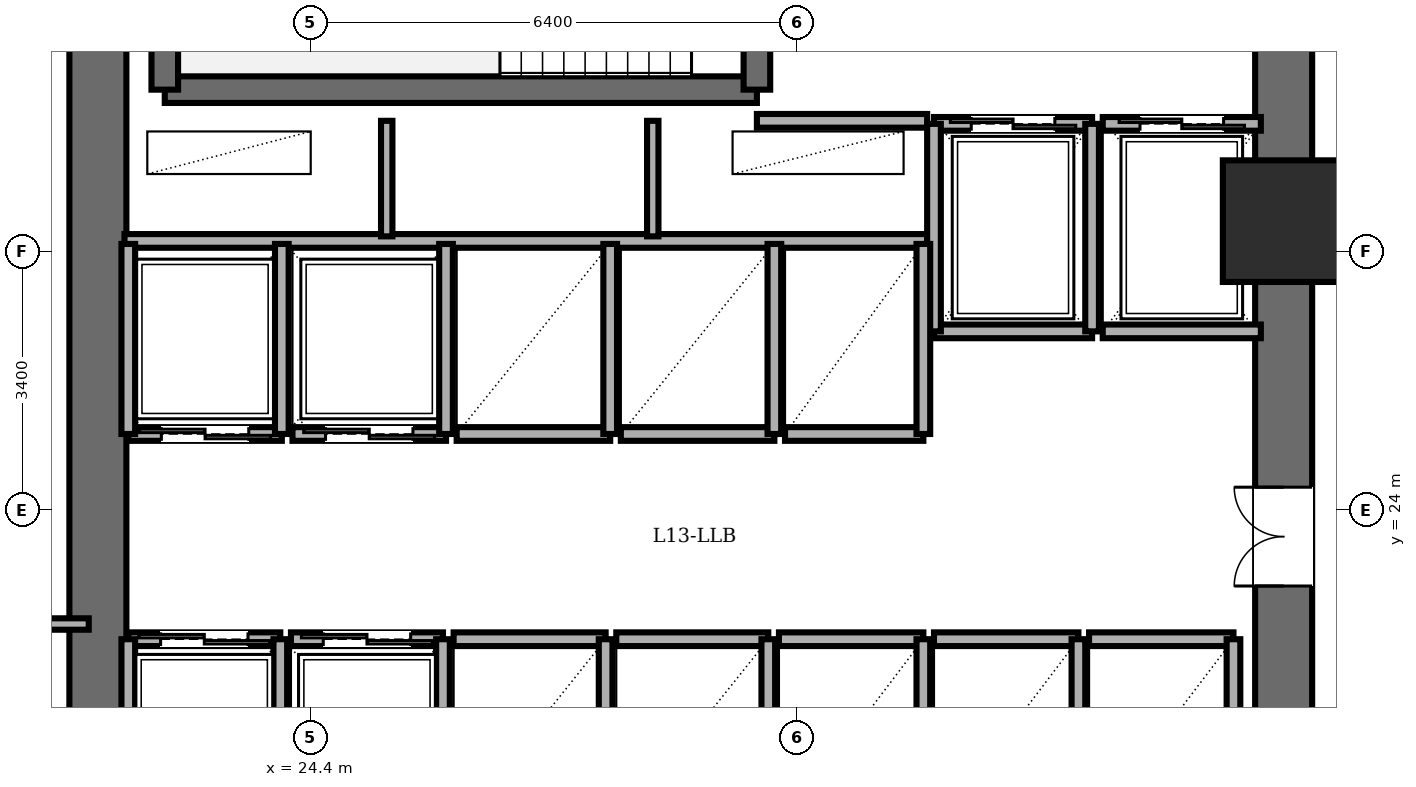
"""IFC4 building model, lengths in metres.
Left out: names, types, materials, properties, quantities, classifications, styles, units other than length and angle.
Written with IfcOpenShell. Run it as: python <this file> out.ifc"""

import sys

from ifc_helpers import new_model, si_unit, direction, frame, frame_2d, origin, origin_2d, place, context, subcontext, project, spatial, rectangle, extrude, element, fill, save


model = new_model("IFC4")
c1 = context("Model", 3, precision=1e-05, world=origin(), true_north=direction((0.0, 1.0)))
c2 = subcontext(c1, "Body", "Model", "MODEL_VIEW")
j1 = project(units=[si_unit("LENGTHUNIT", "METRE"), si_unit("PLANEANGLEUNIT", "RADIAN")], contexts=[c1])
p1 = place(None, origin())
s1 = spatial("IfcSite", under=j1, at=p1, CompositionType="ELEMENT")
p2 = place(p1, origin())
s2 = spatial("IfcBuilding", under=s1, at=p2, CompositionType="ELEMENT")
p3 = place(p2, frame((0.0, 0.0, 50.4)))
s3 = spatial("IfcBuildingStorey", under=s2, at=p3, CompositionType="ELEMENT", Elevation=50.4)
p4 = place(p3, frame((37.2, 27.8, 0.0), z_axis=(0.0, 0.0, 1.0), x_axis=(1.0, 0.0, 0.0)))
e1 = element("IfcColumn", 1, at=p4, inside=s3, PredefinedType="COLUMN", context=c2, shape_type="SweptSolid", body=[
    extrude(rectangle(XDim=1.6, YDim=1.6, at=origin_2d()), origin(), (0.0, 0.0, 1.0), 3.6),
])
p5 = place(p3, frame((21.6, 14.4, 0.0), z_axis=(0.0, 0.0, 1.0), x_axis=(0.0, 1.0, 0.0)))
e2 = element("IfcWall", 2, at=p5, inside=s3, PredefinedType="SHEAR", context=c2, shape_type="SweptSolid", body=[
    extrude(rectangle(XDim=19.2, YDim=0.75, at=frame_2d((9.6, 0.0))), origin(), (0.0, 0.0, 1.0), 3.4),
])
p6 = place(p3, frame((37.2, 14.4, 0.0), z_axis=(0.0, 0.0, 1.0), x_axis=(0.0, 1.0, 0.0)))
e3 = element("IfcWall", 3, at=p6, inside=s3, PredefinedType="SHEAR", context=c2, shape_type="SweptSolid", body=[
    extrude(rectangle(XDim=19.2, YDim=0.75, at=frame_2d((9.6, 0.0))), origin(), (0.0, 0.0, 1.0), 3.4),
])
p7 = place(p6, frame((15.8, 0.0, 0.0)))
e4 = element("IfcOpeningElement", 4, at=p7, cuts=e3, PredefinedType="OPENING", context=c2, shape_type="SweptSolid", body=[
    extrude(rectangle(XDim=1.15, YDim=2.15, at=frame_2d((0.575, 1.075))), frame((0.0, 0.385, 0.0), z_axis=(0.0, -1.0, 0.0), x_axis=(1.0, 0.0, 0.0)), (0.0, 0.0, 1.0), 0.77),
])
p8 = place(p6, frame((3.6, 0.0, 0.0)))
e5 = element("IfcOpeningElement", 5, at=p8, cuts=e3, PredefinedType="OPENING", context=c2, shape_type="SweptSolid", body=[
    extrude(rectangle(XDim=1.1, YDim=2.15, at=frame_2d((0.55, 1.075))), frame((0.0, 0.385, 0.0), z_axis=(0.0, -1.0, 0.0), x_axis=(1.0, 0.0, 0.0)), (0.0, 0.0, 1.0), 0.77),
])
p9 = place(p6, frame((8.6, 0.0, 0.0)))
e6 = element("IfcOpeningElement", 6, at=p9, cuts=e3, PredefinedType="OPENING", context=c2, shape_type="SweptSolid", body=[
    extrude(rectangle(XDim=1.3, YDim=2.2, at=frame_2d((0.65, 1.1))), frame((0.0, 0.385, 0.0), z_axis=(0.0, -1.0, 0.0), x_axis=(1.0, 0.0, 0.0)), (0.0, 0.0, 1.0), 0.77),
])
p10 = place(p3, frame((22.48, 29.53, 0.0), z_axis=(0.0, 0.0, 1.0), x_axis=(1.0, 0.0, 0.0)))
e7 = element("IfcWall", 7, at=p10, inside=s3, PredefinedType="SOLIDWALL", context=c2, shape_type="SweptSolid", body=[
    extrude(rectangle(XDim=7.79, YDim=0.35, at=frame_2d((3.895, 0.0))), origin(), (0.0, 0.0, 1.0), 3.4),
])
p11 = place(p3, frame((22.48, 29.53, 0.0), z_axis=(0.0, 0.0, 1.0), x_axis=(0.0, 1.0, 0.0)))
e8 = element("IfcWall", 8, at=p11, inside=s3, PredefinedType="SOLIDWALL", context=c2, shape_type="SweptSolid", body=[
    extrude(rectangle(XDim=3.58, YDim=0.35, at=frame_2d((1.79, 0.0))), origin(), (0.0, 0.0, 1.0), 3.4),
])
p12 = place(p3, frame((30.27, 29.53, 0.0), z_axis=(0.0, 0.0, 1.0), x_axis=(0.0, 1.0, 0.0)))
e9 = element("IfcWall", 9, at=p12, inside=s3, PredefinedType="SOLIDWALL", context=c2, shape_type="SweptSolid", body=[
    extrude(rectangle(XDim=3.58, YDim=0.35, at=frame_2d((1.79, 0.0))), origin(), (0.0, 0.0, 1.0), 3.4),
])
p13 = place(p12, frame((1.25, 0.0, 0.0)))
e10 = element("IfcOpeningElement", 10, at=p13, cuts=e9, PredefinedType="OPENING", context=c2, shape_type="SweptSolid", body=[
    extrude(rectangle(XDim=1.1, YDim=2.15, at=frame_2d((0.55, 1.075))), frame((0.0, 0.185, 0.0), z_axis=(0.0, -1.0, 0.0), x_axis=(1.0, 0.0, 0.0)), (0.0, 0.0, 1.0), 0.37),
])
p14 = place(p3, frame((30.27, 29.12, 0.0), z_axis=(0.0, 0.0, 1.0), x_axis=(1.0, 0.0, 0.0)))
e11 = element("IfcWall", 11, at=p14, inside=s3, PredefinedType="PARTITIONING", context=c2, shape_type="SweptSolid", body=[
    extrude(rectangle(XDim=2.24, YDim=0.18, at=frame_2d((1.12, 0.0))), origin(), (0.0, 0.0, 1.0), 3.4),
])
p15 = place(p3, frame((21.95, 27.54, 0.0), z_axis=(0.0, 0.0, 1.0), x_axis=(1.0, 0.0, 0.0)))
e12 = element("IfcWall", 12, at=p15, inside=s3, PredefinedType="PARTITIONING", context=c2, shape_type="SweptSolid", body=[
    extrude(rectangle(XDim=10.56, YDim=0.18, at=frame_2d((5.28, 0.0))), origin(), (0.0, 0.0, 1.0), 3.4),
])
for number, where, z_axis, x_axis in (
    (13, (25.4, 27.6, 0.0), (0.0, 0.0, 1.0), (0.0, 1.0, 0.0)),
    (14, (28.9, 27.6, 0.0), (0.0, 0.0, 1.0), (0.0, 1.0, 0.0)),
):
    element("IfcWall", number, at=place(p3, frame(where, z_axis=z_axis, x_axis=x_axis)), inside=s3, PredefinedType="PARTITIONING", context=c2, shape_type="SweptSolid", body=[
        extrude(rectangle(XDim=1.52, YDim=0.15, at=frame_2d((0.76, 0.0))), origin(), (0.0, 0.0, 1.0), 3.4),
    ])
p16 = place(p3, frame((32.6, 29.08, 0.0), z_axis=(0.0, 0.0, 1.0), x_axis=(1.0, 0.0, 0.0)))
e15 = element("IfcWall", 15, at=p16, inside=s3, PredefinedType="PARTITIONING", context=c2, shape_type="SweptSolid", body=[
    extrude(rectangle(XDim=2.08, YDim=0.18, at=frame_2d((1.04, 0.0))), origin(), (0.0, 0.0, 1.0), 3.4),
])
p17 = place(p16, frame((0.49, 0.0, 0.0)))
e16 = element("IfcOpeningElement", 16, at=p17, cuts=e15, PredefinedType="OPENING", context=c2, shape_type="SweptSolid", body=[
    extrude(rectangle(XDim=1.1, YDim=2.2, at=frame_2d((0.55, 1.1))), frame((0.0, 0.1, 0.0), z_axis=(0.0, -1.0, 0.0), x_axis=(1.0, 0.0, 0.0)), (0.0, 0.0, 1.0), 0.2),
])
p18 = place(p3, frame((34.68, 26.35, 0.0), z_axis=(0.0, 0.0, 1.0), x_axis=(-1.0, 0.0, 0.0)))
e17 = element("IfcWall", 17, at=p18, inside=s3, PredefinedType="PARTITIONING", context=c2, shape_type="SweptSolid", body=[
    extrude(rectangle(XDim=2.08, YDim=0.18, at=frame_2d((1.04, 0.0))), origin(), (0.0, 0.0, 1.0), 3.4),
])
for number, where, z_axis, x_axis in (
    (18, (34.68, 26.35, 0.0), (0.0, 0.0, 1.0), (0.0, 1.0, 0.0)),
    (19, (32.6, 29.08, 0.0), (0.0, 0.0, 1.0), (0.0, -1.0, 0.0)),
):
    element("IfcWall", number, at=place(p3, frame(where, z_axis=z_axis, x_axis=x_axis)), inside=s3, PredefinedType="PARTITIONING", context=c2, shape_type="SweptSolid", body=[
        extrude(rectangle(XDim=2.73, YDim=0.18, at=frame_2d((1.365, 0.0))), origin(), (0.0, 0.0, 1.0), 3.4),
    ])
p19 = place(p3, frame((34.82, 29.08, 0.0), z_axis=(0.0, 0.0, 1.0), x_axis=(1.0, 0.0, 0.0)))
e20 = element("IfcWall", 20, at=p19, inside=s3, PredefinedType="PARTITIONING", context=c2, shape_type="SweptSolid", body=[
    extrude(rectangle(XDim=2.08, YDim=0.18, at=frame_2d((1.04, 0.0))), origin(), (0.0, 0.0, 1.0), 3.4),
])
p20 = place(p19, frame((0.49, 0.0, 0.0)))
e21 = element("IfcOpeningElement", 21, at=p20, cuts=e20, PredefinedType="OPENING", context=c2, shape_type="SweptSolid", body=[
    extrude(rectangle(XDim=1.1, YDim=2.2, at=frame_2d((0.55, 1.1))), frame((0.0, 0.1, 0.0), z_axis=(0.0, -1.0, 0.0), x_axis=(1.0, 0.0, 0.0)), (0.0, 0.0, 1.0), 0.2),
])
p21 = place(p3, frame((36.9, 26.35, 0.0), z_axis=(0.0, 0.0, 1.0), x_axis=(-1.0, 0.0, 0.0)))
e22 = element("IfcWall", 22, at=p21, inside=s3, PredefinedType="PARTITIONING", context=c2, shape_type="SweptSolid", body=[
    extrude(rectangle(XDim=2.08, YDim=0.18, at=frame_2d((1.04, 0.0))), origin(), (0.0, 0.0, 1.0), 3.4),
])
p22 = place(p3, frame((24.02, 25.0, 0.0), z_axis=(0.0, 0.0, 1.0), x_axis=(-1.0, 0.0, 0.0)))
e23 = element("IfcWall", 23, at=p22, inside=s3, PredefinedType="PARTITIONING", context=c2, shape_type="SweptSolid", body=[
    extrude(rectangle(XDim=2.02, YDim=0.18, at=frame_2d((1.01, 0.0))), origin(), (0.0, 0.0, 1.0), 3.4),
])
p23 = place(p22, frame((0.435, 0.0, 0.0)))
e24 = element("IfcOpeningElement", 24, at=p23, cuts=e23, PredefinedType="OPENING", context=c2, shape_type="SweptSolid", body=[
    extrude(rectangle(XDim=1.15, YDim=2.2, at=frame_2d((0.575, 1.1))), frame((0.0, 0.1, 0.0), z_axis=(0.0, -1.0, 0.0), x_axis=(1.0, 0.0, 0.0)), (0.0, 0.0, 1.0), 0.2),
])
for number, where, z_axis, x_axis in (
    (25, (24.02, 25.0, 0.0), (0.0, 0.0, 1.0), (0.0, 1.0, 0.0)),
    (26, (22.0, 27.5, 0.0), (0.0, 0.0, 1.0), (0.0, -1.0, 0.0)),
):
    element("IfcWall", number, at=place(p3, frame(where, z_axis=z_axis, x_axis=x_axis)), inside=s3, PredefinedType="PARTITIONING", context=c2, shape_type="SweptSolid", body=[
        extrude(rectangle(XDim=2.5, YDim=0.18, at=frame_2d((1.25, 0.0))), origin(), (0.0, 0.0, 1.0), 3.4),
    ])
p24 = place(p3, frame((26.18, 25.0, 0.0), z_axis=(0.0, 0.0, 1.0), x_axis=(-1.0, 0.0, 0.0)))
e27 = element("IfcWall", 27, at=p24, inside=s3, PredefinedType="PARTITIONING", context=c2, shape_type="SweptSolid", body=[
    extrude(rectangle(XDim=2.02, YDim=0.18, at=frame_2d((1.01, 0.0))), origin(), (0.0, 0.0, 1.0), 3.4),
])
p25 = place(p24, frame((0.435, 0.0, 0.0)))
e28 = element("IfcOpeningElement", 28, at=p25, cuts=e27, PredefinedType="OPENING", context=c2, shape_type="SweptSolid", body=[
    extrude(rectangle(XDim=1.15, YDim=2.2, at=frame_2d((0.575, 1.1))), frame((0.0, 0.1, 0.0), z_axis=(0.0, -1.0, 0.0), x_axis=(1.0, 0.0, 0.0)), (0.0, 0.0, 1.0), 0.2),
])
p26 = place(p3, frame((26.18, 25.0, 0.0), z_axis=(0.0, 0.0, 1.0), x_axis=(0.0, 1.0, 0.0)))
e29 = element("IfcWall", 29, at=p26, inside=s3, PredefinedType="PARTITIONING", context=c2, shape_type="SweptSolid", body=[
    extrude(rectangle(XDim=2.5, YDim=0.18, at=frame_2d((1.25, 0.0))), origin(), (0.0, 0.0, 1.0), 3.4),
])
p27 = place(p3, frame((22.0, 22.3, 0.0), z_axis=(0.0, 0.0, 1.0), x_axis=(1.0, 0.0, 0.0)))
e30 = element("IfcWall", 30, at=p27, inside=s3, PredefinedType="PARTITIONING", context=c2, shape_type="SweptSolid", body=[
    extrude(rectangle(XDim=2.0, YDim=0.18, at=frame_2d((1.0, 0.0))), origin(), (0.0, 0.0, 1.0), 3.4),
])
p28 = place(p27, frame((0.425, 0.0, 0.0)))
e31 = element("IfcOpeningElement", 31, at=p28, cuts=e30, PredefinedType="OPENING", context=c2, shape_type="SweptSolid", body=[
    extrude(rectangle(XDim=1.15, YDim=2.2, at=frame_2d((0.575, 1.1))), frame((0.0, 0.1, 0.0), z_axis=(0.0, -1.0, 0.0), x_axis=(1.0, 0.0, 0.0)), (0.0, 0.0, 1.0), 0.2),
])
for number, where, z_axis, x_axis in (
    (32, (24.0, 19.8, 0.0), (0.0, 0.0, 1.0), (0.0, 1.0, 0.0)),
    (33, (22.0, 22.3, 0.0), (0.0, 0.0, 1.0), (0.0, -1.0, 0.0)),
):
    element("IfcWall", number, at=place(p3, frame(where, z_axis=z_axis, x_axis=x_axis)), inside=s3, PredefinedType="PARTITIONING", context=c2, shape_type="SweptSolid", body=[
        extrude(rectangle(XDim=2.5, YDim=0.18, at=frame_2d((1.25, 0.0))), origin(), (0.0, 0.0, 1.0), 3.4),
    ])
p29 = place(p3, frame((24.14, 22.3, 0.0), z_axis=(0.0, 0.0, 1.0), x_axis=(1.0, 0.0, 0.0)))
e34 = element("IfcWall", 34, at=p29, inside=s3, PredefinedType="PARTITIONING", context=c2, shape_type="SweptSolid", body=[
    extrude(rectangle(XDim=2.0, YDim=0.18, at=frame_2d((1.0, 0.0))), origin(), (0.0, 0.0, 1.0), 3.4),
])
p30 = place(p29, frame((0.425, 0.0, 0.0)))
e35 = element("IfcOpeningElement", 35, at=p30, cuts=e34, PredefinedType="OPENING", context=c2, shape_type="SweptSolid", body=[
    extrude(rectangle(XDim=1.15, YDim=2.2, at=frame_2d((0.575, 1.1))), frame((0.0, 0.1, 0.0), z_axis=(0.0, -1.0, 0.0), x_axis=(1.0, 0.0, 0.0)), (0.0, 0.0, 1.0), 0.2),
])
p31 = place(p3, frame((26.14, 19.8, 0.0), z_axis=(0.0, 0.0, 1.0), x_axis=(0.0, 1.0, 0.0)))
e36 = element("IfcWall", 36, at=p31, inside=s3, PredefinedType="PARTITIONING", context=c2, shape_type="SweptSolid", body=[
    extrude(rectangle(XDim=2.5, YDim=0.18, at=frame_2d((1.25, 0.0))), origin(), (0.0, 0.0, 1.0), 3.4),
])
p32 = place(p3, frame((28.34, 25.0, 0.0), z_axis=(0.0, 0.0, 1.0), x_axis=(-1.0, 0.0, 0.0)))
e37 = element("IfcWall", 37, at=p32, inside=s3, PredefinedType="PARTITIONING", context=c2, shape_type="SweptSolid", body=[
    extrude(rectangle(XDim=2.02, YDim=0.18, at=frame_2d((1.01, 0.0))), origin(), (0.0, 0.0, 1.0), 3.4),
])
p33 = place(p3, frame((28.34, 25.0, 0.0), z_axis=(0.0, 0.0, 1.0), x_axis=(0.0, 1.0, 0.0)))
e38 = element("IfcWall", 38, at=p33, inside=s3, PredefinedType="PARTITIONING", context=c2, shape_type="SweptSolid", body=[
    extrude(rectangle(XDim=2.5, YDim=0.18, at=frame_2d((1.25, 0.0))), origin(), (0.0, 0.0, 1.0), 3.4),
])
p34 = place(p3, frame((30.5, 25.0, 0.0), z_axis=(0.0, 0.0, 1.0), x_axis=(-1.0, 0.0, 0.0)))
e39 = element("IfcWall", 39, at=p34, inside=s3, PredefinedType="PARTITIONING", context=c2, shape_type="SweptSolid", body=[
    extrude(rectangle(XDim=2.02, YDim=0.18, at=frame_2d((1.01, 0.0))), origin(), (0.0, 0.0, 1.0), 3.4),
])
p35 = place(p3, frame((30.5, 25.0, 0.0), z_axis=(0.0, 0.0, 1.0), x_axis=(0.0, 1.0, 0.0)))
e40 = element("IfcWall", 40, at=p35, inside=s3, PredefinedType="PARTITIONING", context=c2, shape_type="SweptSolid", body=[
    extrude(rectangle(XDim=2.5, YDim=0.18, at=frame_2d((1.25, 0.0))), origin(), (0.0, 0.0, 1.0), 3.4),
])
p36 = place(p3, frame((26.28, 22.3, 0.0), z_axis=(0.0, 0.0, 1.0), x_axis=(1.0, 0.0, 0.0)))
e41 = element("IfcWall", 41, at=p36, inside=s3, PredefinedType="PARTITIONING", context=c2, shape_type="SweptSolid", body=[
    extrude(rectangle(XDim=2.0, YDim=0.18, at=frame_2d((1.0, 0.0))), origin(), (0.0, 0.0, 1.0), 3.4),
])
p37 = place(p3, frame((28.28, 19.8, 0.0), z_axis=(0.0, 0.0, 1.0), x_axis=(0.0, 1.0, 0.0)))
e42 = element("IfcWall", 42, at=p37, inside=s3, PredefinedType="PARTITIONING", context=c2, shape_type="SweptSolid", body=[
    extrude(rectangle(XDim=2.5, YDim=0.18, at=frame_2d((1.25, 0.0))), origin(), (0.0, 0.0, 1.0), 3.4),
])
p38 = place(p3, frame((28.42, 22.3, 0.0), z_axis=(0.0, 0.0, 1.0), x_axis=(1.0, 0.0, 0.0)))
e43 = element("IfcWall", 43, at=p38, inside=s3, PredefinedType="PARTITIONING", context=c2, shape_type="SweptSolid", body=[
    extrude(rectangle(XDim=2.0, YDim=0.18, at=frame_2d((1.0, 0.0))), origin(), (0.0, 0.0, 1.0), 3.4),
])
p39 = place(p3, frame((30.42, 19.8, 0.0), z_axis=(0.0, 0.0, 1.0), x_axis=(0.0, 1.0, 0.0)))
e44 = element("IfcWall", 44, at=p39, inside=s3, PredefinedType="PARTITIONING", context=c2, shape_type="SweptSolid", body=[
    extrude(rectangle(XDim=2.5, YDim=0.18, at=frame_2d((1.25, 0.0))), origin(), (0.0, 0.0, 1.0), 3.4),
])
p40 = place(p3, frame((32.46, 25.0, 0.0), z_axis=(0.0, 0.0, 1.0), x_axis=(-1.0, 0.0, 0.0)))
e45 = element("IfcWall", 45, at=p40, inside=s3, PredefinedType="PARTITIONING", context=c2, shape_type="SweptSolid", body=[
    extrude(rectangle(XDim=1.82, YDim=0.18, at=frame_2d((0.91, 0.0))), origin(), (0.0, 0.0, 1.0), 3.4),
])
p41 = place(p3, frame((32.46, 25.0, 0.0), z_axis=(0.0, 0.0, 1.0), x_axis=(0.0, 1.0, 0.0)))
e46 = element("IfcWall", 46, at=p41, inside=s3, PredefinedType="PARTITIONING", context=c2, shape_type="SweptSolid", body=[
    extrude(rectangle(XDim=2.5, YDim=0.18, at=frame_2d((1.25, 0.0))), origin(), (0.0, 0.0, 1.0), 3.4),
])
p42 = place(p3, frame((30.56, 22.3, 0.0), z_axis=(0.0, 0.0, 1.0), x_axis=(1.0, 0.0, 0.0)))
e47 = element("IfcWall", 47, at=p42, inside=s3, PredefinedType="PARTITIONING", context=c2, shape_type="SweptSolid", body=[
    extrude(rectangle(XDim=1.9, YDim=0.18, at=frame_2d((0.95, 0.0))), origin(), (0.0, 0.0, 1.0), 3.4),
])
p43 = place(p3, frame((32.46, 19.8, 0.0), z_axis=(0.0, 0.0, 1.0), x_axis=(0.0, 1.0, 0.0)))
e48 = element("IfcWall", 48, at=p43, inside=s3, PredefinedType="PARTITIONING", context=c2, shape_type="SweptSolid", body=[
    extrude(rectangle(XDim=2.5, YDim=0.18, at=frame_2d((1.25, 0.0))), origin(), (0.0, 0.0, 1.0), 3.4),
])
p44 = place(p3, frame((32.6, 22.3, 0.0), z_axis=(0.0, 0.0, 1.0), x_axis=(1.0, 0.0, 0.0)))
e49 = element("IfcWall", 49, at=p44, inside=s3, PredefinedType="PARTITIONING", context=c2, shape_type="SweptSolid", body=[
    extrude(rectangle(XDim=1.9, YDim=0.18, at=frame_2d((0.95, 0.0))), origin(), (0.0, 0.0, 1.0), 3.4),
])
p45 = place(p3, frame((34.5, 19.8, 0.0), z_axis=(0.0, 0.0, 1.0), x_axis=(0.0, 1.0, 0.0)))
e50 = element("IfcWall", 50, at=p45, inside=s3, PredefinedType="PARTITIONING", context=c2, shape_type="SweptSolid", body=[
    extrude(rectangle(XDim=2.5, YDim=0.18, at=frame_2d((1.25, 0.0))), origin(), (0.0, 0.0, 1.0), 3.4),
])
p46 = place(p3, frame((34.64, 22.3, 0.0), z_axis=(0.0, 0.0, 1.0), x_axis=(1.0, 0.0, 0.0)))
e51 = element("IfcWall", 51, at=p46, inside=s3, PredefinedType="PARTITIONING", context=c2, shape_type="SweptSolid", body=[
    extrude(rectangle(XDim=1.9, YDim=0.18, at=frame_2d((0.95, 0.0))), origin(), (0.0, 0.0, 1.0), 3.4),
])
p47 = place(p3, frame((36.54, 19.8, 0.0), z_axis=(0.0, 0.0, 1.0), x_axis=(0.0, 1.0, 0.0)))
e52 = element("IfcWall", 52, at=p47, inside=s3, PredefinedType="PARTITIONING", context=c2, shape_type="SweptSolid", body=[
    extrude(rectangle(XDim=2.5, YDim=0.18, at=frame_2d((1.25, 0.0))), origin(), (0.0, 0.0, 1.0), 3.4),
])
p48 = place(p3, frame((3.4, 22.5, 0.0), z_axis=(0.0, 0.0, 1.0), x_axis=(1.0, 0.0, 0.0)))
e53 = element("IfcWall", 53, at=p48, inside=s3, PredefinedType="PARTITIONING", context=c2, shape_type="SweptSolid", body=[
    extrude(rectangle(XDim=18.08, YDim=0.15, at=frame_2d((9.04, 0.0))), origin(), (0.0, 0.0, 1.0), 3.4),
])
p49 = place(p17, origin())
e54 = element("IfcDoor", 54, at=p49, inside=s3, OperationType="DOUBLE_DOOR_SLIDING", PredefinedType="DOOR", context=c2, shape_type="SweptSolid", body=[
    extrude(rectangle(XDim=1.1, YDim=2.2, at=frame_2d((0.55, 1.1))), frame((0.0, 0.025, 0.0), z_axis=(0.0, -1.0, 0.0), x_axis=(1.0, 0.0, 0.0)), (0.0, 0.0, 1.0), 0.05),
])
fill(e16, e54)
p50 = place(p20, origin())
e55 = element("IfcDoor", 55, at=p50, inside=s3, OperationType="DOUBLE_DOOR_SLIDING", PredefinedType="DOOR", context=c2, shape_type="SweptSolid", body=[
    extrude(rectangle(XDim=1.1, YDim=2.2, at=frame_2d((0.55, 1.1))), frame((0.0, 0.025, 0.0), z_axis=(0.0, -1.0, 0.0), x_axis=(1.0, 0.0, 0.0)), (0.0, 0.0, 1.0), 0.05),
])
fill(e21, e55)
p51 = place(p23, origin())
e56 = element("IfcDoor", 56, at=p51, inside=s3, OperationType="DOUBLE_DOOR_SLIDING", PredefinedType="DOOR", context=c2, shape_type="SweptSolid", body=[
    extrude(rectangle(XDim=1.15, YDim=2.2, at=frame_2d((0.575, 1.1))), frame((0.0, 0.025, 0.0), z_axis=(0.0, -1.0, 0.0), x_axis=(1.0, 0.0, 0.0)), (0.0, 0.0, 1.0), 0.05),
])
fill(e24, e56)
p52 = place(p25, origin())
e57 = element("IfcDoor", 57, at=p52, inside=s3, OperationType="DOUBLE_DOOR_SLIDING", PredefinedType="DOOR", context=c2, shape_type="SweptSolid", body=[
    extrude(rectangle(XDim=1.15, YDim=2.2, at=frame_2d((0.575, 1.1))), frame((0.0, 0.025, 0.0), z_axis=(0.0, -1.0, 0.0), x_axis=(1.0, 0.0, 0.0)), (0.0, 0.0, 1.0), 0.05),
])
fill(e28, e57)
p53 = place(p28, origin())
e58 = element("IfcDoor", 58, at=p53, inside=s3, OperationType="DOUBLE_DOOR_SLIDING", PredefinedType="DOOR", context=c2, shape_type="SweptSolid", body=[
    extrude(rectangle(XDim=1.15, YDim=2.2, at=frame_2d((0.575, 1.1))), frame((0.0, 0.025, 0.0), z_axis=(0.0, -1.0, 0.0), x_axis=(1.0, 0.0, 0.0)), (0.0, 0.0, 1.0), 0.05),
])
fill(e31, e58)
p54 = place(p30, origin())
e59 = element("IfcDoor", 59, at=p54, inside=s3, OperationType="DOUBLE_DOOR_SLIDING", PredefinedType="DOOR", context=c2, shape_type="SweptSolid", body=[
    extrude(rectangle(XDim=1.15, YDim=2.2, at=frame_2d((0.575, 1.1))), frame((0.0, 0.025, 0.0), z_axis=(0.0, -1.0, 0.0), x_axis=(1.0, 0.0, 0.0)), (0.0, 0.0, 1.0), 0.05),
])
fill(e35, e59)
p55 = place(p9, origin())
e60 = element("IfcDoor", 60, at=p55, inside=s3, OperationType="DOUBLE_DOOR_SINGLE_SWING", PredefinedType="DOOR", context=c2, shape_type="SweptSolid", body=[
    extrude(rectangle(XDim=1.3, YDim=2.2, at=frame_2d((0.65, 1.1))), frame((0.0, 0.025, 0.0), z_axis=(0.0, -1.0, 0.0), x_axis=(1.0, 0.0, 0.0)), (0.0, 0.0, 1.0), 0.05),
])
fill(e6, e60)
save(model, sys.argv[1])
